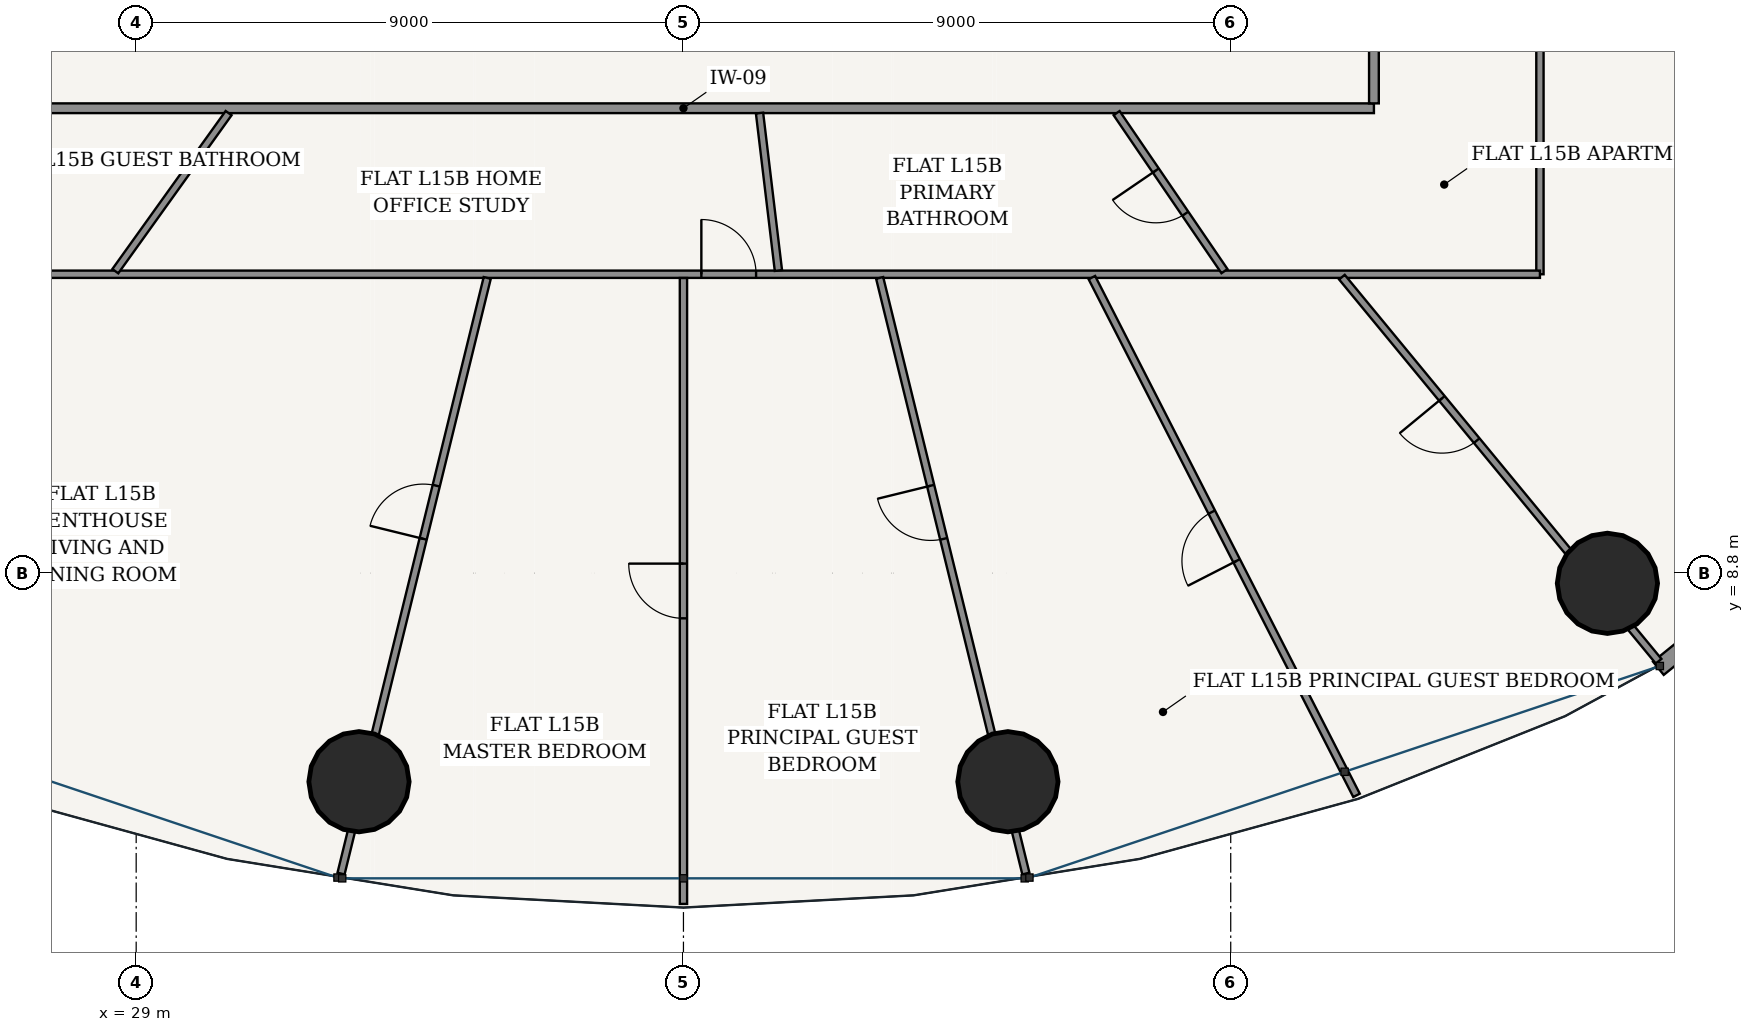
"""IFC4 building model, lengths in metres.
Left out: names, types, materials, properties, quantities, classifications, styles, units other than length and angle.
Written with IfcOpenShell. Run it as: python <this file> out.ifc"""

import sys

from ifc_helpers import new_model, si_unit, direction, frame, frame_2d, origin, origin_2d, place, context, subcontext, project, spatial, rectangle, hollow_circle, extrude, source, transform, mapped, element, fill, save


model = new_model("IFC4")
c1 = context("Model", 3, precision=1e-05, world=origin(), true_north=direction((-0.2419218956, 0.970295726276)))
c2 = subcontext(c1, "Body", "Model", "MODEL_VIEW")
j1 = project(units=[si_unit("LENGTHUNIT", "METRE"), si_unit("PLANEANGLEUNIT", "RADIAN")], contexts=[c1])
p1 = place(None, origin())
s1 = spatial("IfcSite", under=j1, at=p1, CompositionType="ELEMENT")
p2 = place(p1, origin())
s2 = spatial("IfcBuilding", under=s1, at=p2, CompositionType="ELEMENT")
p3 = place(p2, frame((0.0, 0.0, 60.0)))
s3 = spatial("IfcBuildingStorey", under=s2, at=p3, CompositionType="ELEMENT", Elevation=60.0)
for number, where, z_axis, x_axis in (
    (1, (32.664, 5.37, 0.0), (0.0, 0.0, 1.0), (1.0, 0.0, 0.0)),
    (2, (43.336, 5.37, 0.0), (0.0, 0.0, 1.0), (1.0, 0.0, 0.0)),
    (3, (53.195, 8.632, 0.0), (0.0, 0.0, 1.0), (1.0, 0.0, 0.0)),
):
    element("IfcColumn", number, at=place(p3, frame(where, z_axis=z_axis, x_axis=x_axis)), inside=s3, PredefinedType="COLUMN", context=c2, shape_type="SweptSolid", body=[
        extrude(hollow_circle(Radius=0.825, WallThickness=0.05, at=origin_2d()), origin(), (0.0, 0.0, 1.0), 3.6),
    ])
p4 = place(p3, frame((54.033, 7.235, 0.0), z_axis=(0.0, 0.0, 1.0), x_axis=(0.777016782851, 0.629479879875, 0.0)))
e4 = element("IfcWall", 4, at=p4, inside=s3, PredefinedType="SOLIDWALL", context=c2, shape_type="SweptSolid", body=[
    extrude(rectangle(XDim=10.447, YDim=0.28, at=frame_2d((5.223, 0.0))), origin(), (0.0, 0.0, 1.0), 3.32),
])
p5 = place(p4, frame((1.771, 0.0, 0.85)))
e5 = element("IfcOpeningElement", 5, at=p5, cuts=e4, PredefinedType="OPENING", context=c2, shape_type="SweptSolid", body=[
    extrude(rectangle(XDim=2.1, YDim=1.95, at=frame_2d((1.05, 0.975))), frame((0.0, 0.15, 0.0), z_axis=(0.0, -1.0, 0.0), x_axis=(1.0, 0.0, 0.0)), (0.0, 0.0, 1.0), 0.3),
])
p6 = place(p4, frame((6.576, 0.0, 0.85)))
e6 = element("IfcOpeningElement", 6, at=p6, cuts=e4, PredefinedType="OPENING", context=c2, shape_type="SweptSolid", body=[
    extrude(rectangle(XDim=2.1, YDim=1.95, at=frame_2d((1.05, 0.975))), frame((0.0, 0.15, 0.0), z_axis=(0.0, -1.0, 0.0), x_axis=(1.0, 0.0, 0.0)), (0.0, 0.0, 1.0), 0.3),
])
p7 = place(p3, frame((26.645, 16.445, 0.0), z_axis=(0.0, 0.0, 1.0), x_axis=(1.0, 0.0, 0.0)))
e7 = element("IfcWall", 7, at=p7, inside=s3, PredefinedType="PARTITIONING", context=c2, shape_type="SweptSolid", body=[
    extrude(rectangle(XDim=22.71, YDim=0.16, at=frame_2d((11.355, 0.0))), origin(), (0.0, 0.0, 1.0), 2.688),
])
p8 = place(p3, frame((49.355, 16.525, 0.0), z_axis=(0.0, 0.0, 1.0), x_axis=(0.0, 1.0, 0.0)))
e8 = element("IfcWall", 8, at=p8, inside=s3, PredefinedType="PARTITIONING", context=c2, shape_type="SweptSolid", body=[
    extrude(rectangle(XDim=20.55, YDim=0.16, at=frame_2d((10.275, 0.0))), origin(), (0.0, 0.0, 1.0), 2.688),
])
p9 = place(p8, frame((2.733, 0.0, 0.0)))
e9 = element("IfcOpeningElement", 9, at=p9, cuts=e8, PredefinedType="OPENING", context=c2, shape_type="SweptSolid", body=[
    extrude(rectangle(XDim=0.98, YDim=2.2, at=frame_2d((0.49, 1.1))), frame((0.0, 0.09, 0.0), z_axis=(0.0, -1.0, 0.0), x_axis=(1.0, 0.0, 0.0)), (0.0, 0.0, 1.0), 0.18),
])
p10 = place(p3, frame((52.085, 34.324, 0.0), z_axis=(0.0, 0.0, 1.0), x_axis=(0.0, -1.0, 0.0)))
e10 = element("IfcWall", 10, at=p10, inside=s3, PredefinedType="PARTITIONING", context=c2, shape_type="SweptSolid", body=[
    extrude(rectangle(XDim=20.609, YDim=0.12, at=frame_2d((10.305, 0.0))), origin(), (0.0, 0.0, 1.0), 2.688),
])
p11 = place(p10, frame((15.972, 0.0, 0.0)))
e11 = element("IfcOpeningElement", 11, at=p11, cuts=e10, PredefinedType="OPENING", context=c2, shape_type="SweptSolid", body=[
    extrude(rectangle(XDim=0.9, YDim=2.15, at=frame_2d((0.45, 1.075))), frame((0.0, 0.07, 0.0), z_axis=(0.0, -1.0, 0.0), x_axis=(1.0, 0.0, 0.0)), (0.0, 0.0, 1.0), 0.14),
])
p12 = place(p10, frame((3.058, 0.0, 0.0)))
e12 = element("IfcOpeningElement", 12, at=p12, cuts=e10, PredefinedType="OPENING", context=c2, shape_type="SweptSolid", body=[
    extrude(rectangle(XDim=0.9, YDim=2.15, at=frame_2d((0.45, 1.075))), frame((0.0, 0.07, 0.0), z_axis=(0.0, -1.0, 0.0), x_axis=(1.0, 0.0, 0.0)), (0.0, 0.0, 1.0), 0.14),
])
p13 = place(p3, frame((52.085, 13.715, 0.0), z_axis=(0.0, 0.0, 1.0), x_axis=(-1.0, 0.0, 0.0)))
e13 = element("IfcWall", 13, at=p13, inside=s3, PredefinedType="PARTITIONING", context=c2, shape_type="SweptSolid", body=[
    extrude(rectangle(XDim=28.17, YDim=0.12, at=frame_2d((14.085, 0.0))), origin(), (0.0, 0.0, 1.0), 2.688),
])
p14 = place(p13, frame((12.891, 0.0, 0.0)))
e14 = element("IfcOpeningElement", 14, at=p14, cuts=e13, PredefinedType="OPENING", context=c2, shape_type="SweptSolid", body=[
    extrude(rectangle(XDim=0.9, YDim=2.15, at=frame_2d((0.45, 1.075))), frame((0.0, 0.07, 0.0), z_axis=(0.0, -1.0, 0.0), x_axis=(1.0, 0.0, 0.0)), (0.0, 0.0, 1.0), 0.14),
])
p15 = place(p3, frame((34.773, 13.655, 0.0), z_axis=(0.0, 0.0, 1.0), x_axis=(-0.238375747469, -0.97117300365, 0.0)))
e15 = element("IfcWall", 15, at=p15, inside=s3, PredefinedType="PARTITIONING", context=c2, shape_type="SweptSolid", body=[
    extrude(rectangle(XDim=10.086, YDim=0.12, at=frame_2d((5.043, 0.0))), origin(), (0.0, 0.0, 1.0), 2.688),
])
p16 = place(p15, frame((3.518, 0.0, 0.0)))
e16 = element("IfcOpeningElement", 16, at=p16, cuts=e15, PredefinedType="OPENING", context=c2, shape_type="SweptSolid", body=[
    extrude(rectangle(XDim=0.9, YDim=2.15, at=frame_2d((0.45, 1.075))), frame((0.0, 0.07, 0.0), z_axis=(0.0, -1.0, 0.0), x_axis=(1.0, 0.0, 0.0)), (0.0, 0.0, 1.0), 0.14),
])
p17 = place(p3, frame((38.0, 13.653, 0.0), z_axis=(0.0, 0.0, 1.0), x_axis=(0.0, -1.0, 0.0)))
e17 = element("IfcWall", 17, at=p17, inside=s3, PredefinedType="PARTITIONING", context=c2, shape_type="SweptSolid", body=[
    extrude(rectangle(XDim=10.293, YDim=0.12, at=frame_2d((5.146, 0.0))), origin(), (0.0, 0.0, 1.0), 2.762),
])
p18 = place(p17, frame((4.697, 0.0, 0.0)))
e18 = element("IfcOpeningElement", 18, at=p18, cuts=e17, PredefinedType="OPENING", context=c2, shape_type="SweptSolid", body=[
    extrude(rectangle(XDim=0.9, YDim=2.15, at=frame_2d((0.45, 1.075))), frame((0.0, 0.07, 0.0), z_axis=(0.0, -1.0, 0.0), x_axis=(1.0, 0.0, 0.0)), (0.0, 0.0, 1.0), 0.14),
])
p19 = place(p3, frame((41.227, 13.655, 0.0), z_axis=(0.0, 0.0, 1.0), x_axis=(0.238375747469, -0.97117300365, 0.0)))
e19 = element("IfcWall", 19, at=p19, inside=s3, PredefinedType="PARTITIONING", context=c2, shape_type="SweptSolid", body=[
    extrude(rectangle(XDim=10.086, YDim=0.12, at=frame_2d((5.043, 0.0))), origin(), (0.0, 0.0, 1.0), 2.688),
])
p20 = place(p19, frame((3.519, 0.0, 0.0)))
e20 = element("IfcOpeningElement", 20, at=p20, cuts=e19, PredefinedType="OPENING", context=c2, shape_type="SweptSolid", body=[
    extrude(rectangle(XDim=0.9, YDim=2.15, at=frame_2d((0.45, 1.075))), frame((0.0, 0.07, 0.0), z_axis=(0.0, -1.0, 0.0), x_axis=(1.0, 0.0, 0.0)), (0.0, 0.0, 1.0), 0.14),
])
p21 = place(p3, frame((44.717, 13.66, 0.0), z_axis=(0.0, 0.0, 1.0), x_axis=(0.455131303234, -0.890424335256, 0.0)))
e21 = element("IfcWall", 21, at=p21, inside=s3, PredefinedType="PARTITIONING", context=c2, shape_type="SweptSolid", body=[
    extrude(rectangle(XDim=9.562, YDim=0.12, at=frame_2d((4.781, 0.0))), origin(), (0.0, 0.0, 1.0), 2.762),
])
p22 = place(p21, frame((4.331, 0.0, 0.0)))
e22 = element("IfcOpeningElement", 22, at=p22, cuts=e21, PredefinedType="OPENING", context=c2, shape_type="SweptSolid", body=[
    extrude(rectangle(XDim=0.9, YDim=2.15, at=frame_2d((0.45, 1.075))), frame((0.0, 0.07, 0.0), z_axis=(0.0, -1.0, 0.0), x_axis=(1.0, 0.0, 0.0)), (0.0, 0.0, 1.0), 0.14),
])
p23 = place(p3, frame((48.829, 13.667, 0.0), z_axis=(0.0, 0.0, 1.0), x_axis=(0.636177533893, -0.771542704826, 0.0)))
e23 = element("IfcWall", 23, at=p23, inside=s3, PredefinedType="PARTITIONING", context=c2, shape_type="SweptSolid", body=[
    extrude(rectangle(XDim=8.187, YDim=0.12, at=frame_2d((4.093, 0.0))), origin(), (0.0, 0.0, 1.0), 2.688),
])
p24 = place(p23, frame((2.584, 0.0, 0.0)))
e24 = element("IfcOpeningElement", 24, at=p24, cuts=e23, PredefinedType="OPENING", context=c2, shape_type="SweptSolid", body=[
    extrude(rectangle(XDim=0.9, YDim=2.15, at=frame_2d((0.45, 1.075))), frame((0.0, 0.07, 0.0), z_axis=(0.0, -1.0, 0.0), x_axis=(1.0, 0.0, 0.0)), (0.0, 0.0, 1.0), 0.14),
])
p25 = place(p3, frame((30.52, 16.365, 0.0), z_axis=(0.0, 0.0, 1.0), x_axis=(-0.582566008831, -0.812783393872, 0.0)))
e25 = element("IfcWall", 25, at=p25, inside=s3, PredefinedType="PARTITIONING", context=c2, shape_type="SweptSolid", body=[
    extrude(rectangle(XDim=3.198, YDim=0.12, at=frame_2d((1.599, 0.0))), origin(), (0.0, 0.0, 1.0), 3.32),
])
p26 = place(p3, frame((39.251, 16.365, 0.0), z_axis=(0.0, 0.0, 1.0), x_axis=(0.1191230636, -0.992879497078, 0.0)))
e26 = element("IfcWall", 26, at=p26, inside=s3, PredefinedType="PARTITIONING", context=c2, shape_type="SweptSolid", body=[
    extrude(rectangle(XDim=2.607, YDim=0.12, at=frame_2d((1.303, 0.0))), origin(), (0.0, 0.0, 1.0), 3.32),
])
p27 = place(p3, frame((45.123, 16.365, 0.0), z_axis=(0.0, 0.0, 1.0), x_axis=(0.563762888243, -0.825936683917, 0.0)))
e27 = element("IfcWall", 27, at=p27, inside=s3, PredefinedType="PARTITIONING", context=c2, shape_type="SweptSolid", body=[
    extrude(rectangle(XDim=3.146, YDim=0.12, at=frame_2d((1.573, 0.0))), origin(), (0.0, 0.0, 1.0), 3.32),
])
p28 = place(p27, frame((1.143, 0.0, 0.0)))
e28 = element("IfcOpeningElement", 28, at=p28, cuts=e27, PredefinedType="OPENING", context=c2, shape_type="SweptSolid", body=[
    extrude(rectangle(XDim=0.86, YDim=2.15, at=frame_2d((0.43, 1.075))), frame((0.0, 0.07, 0.0), z_axis=(0.0, -1.0, 0.0), x_axis=(1.0, 0.0, 0.0)), (0.0, 0.0, 1.0), 0.14),
])
m1 = source(origin(), c2, "Body", "SweptSolid", [
    extrude(rectangle(XDim=0.86, YDim=2.15, at=frame_2d((0.43, 1.075))), frame((0.0, 0.025, 0.0), z_axis=(0.0, -1.0, 0.0), x_axis=(1.0, 0.0, 0.0)), (0.0, 0.0, 1.0), 0.05),
])
p29 = place(p28, frame((0.86, 0.0, 0.0), z_axis=(0.0, 0.0, 1.0), x_axis=(-1.0, 0.0, 0.0)))
e29 = element("IfcDoor", 29, at=p29, inside=s3, OperationType="SINGLE_SWING_RIGHT", PredefinedType="DOOR", context=c2, shape_type="MappedRepresentation", body=[
    mapped(m1, transform((0.0, 0.0, 0.0), scale=1.0)),
])
fill(e28, e29)
m2 = source(origin(), c2, "Body", "SweptSolid", [
    extrude(rectangle(XDim=0.9, YDim=2.15, at=frame_2d((0.45, 1.075))), frame((0.0, 0.025, 0.0), z_axis=(0.0, -1.0, 0.0), x_axis=(1.0, 0.0, 0.0)), (0.0, 0.0, 1.0), 0.05),
])
p30 = place(p24, frame((0.9, 0.0, 0.0), z_axis=(0.0, 0.0, 1.0), x_axis=(-1.0, 0.0, 0.0)))
e30 = element("IfcDoor", 30, at=p30, inside=s3, OperationType="SINGLE_SWING_RIGHT", PredefinedType="DOOR", context=c2, shape_type="MappedRepresentation", body=[
    mapped(m2, transform((0.0, 0.0, 0.0), scale=1.0)),
])
fill(e24, e30)
p31 = place(p22, frame((0.9, 0.0, 0.0), z_axis=(0.0, 0.0, 1.0), x_axis=(-1.0, 0.0, 0.0)))
e31 = element("IfcDoor", 31, at=p31, inside=s3, OperationType="SINGLE_SWING_LEFT", PredefinedType="DOOR", context=c2, shape_type="MappedRepresentation", body=[
    mapped(m2, transform((0.0, 0.0, 0.0), scale=1.0)),
])
fill(e22, e31)
p32 = place(p20, frame((0.9, 0.0, 0.0), z_axis=(0.0, 0.0, 1.0), x_axis=(-1.0, 0.0, 0.0)))
e32 = element("IfcDoor", 32, at=p32, inside=s3, OperationType="SINGLE_SWING_RIGHT", PredefinedType="DOOR", context=c2, shape_type="MappedRepresentation", body=[
    mapped(m2, transform((0.0, 0.0, 0.0), scale=1.0)),
])
fill(e20, e32)
p33 = place(p14, frame((0.9, 0.0, 0.0), z_axis=(0.0, 0.0, 1.0), x_axis=(-1.0, 0.0, 0.0)))
e33 = element("IfcDoor", 33, at=p33, inside=s3, OperationType="SINGLE_SWING_LEFT", PredefinedType="DOOR", context=c2, shape_type="MappedRepresentation", body=[
    mapped(m2, transform((0.0, 0.0, 0.0), scale=1.0)),
])
fill(e14, e33)
p34 = place(p18, frame((0.9, 0.0, 0.0), z_axis=(0.0, 0.0, 1.0), x_axis=(-1.0, 0.0, 0.0)))
e34 = element("IfcDoor", 34, at=p34, inside=s3, OperationType="SINGLE_SWING_RIGHT", PredefinedType="DOOR", context=c2, shape_type="MappedRepresentation", body=[
    mapped(m2, transform((0.0, 0.0, 0.0), scale=1.0)),
])
fill(e18, e34)
p35 = place(p16, frame((0.9, 0.0, 0.0), z_axis=(0.0, 0.0, 1.0), x_axis=(-1.0, 0.0, 0.0)))
e35 = element("IfcDoor", 35, at=p35, inside=s3, OperationType="SINGLE_SWING_LEFT", PredefinedType="DOOR", context=c2, shape_type="MappedRepresentation", body=[
    mapped(m2, transform((0.0, 0.0, 0.0), scale=1.0)),
])
fill(e16, e35)
save(model, sys.argv[1])
